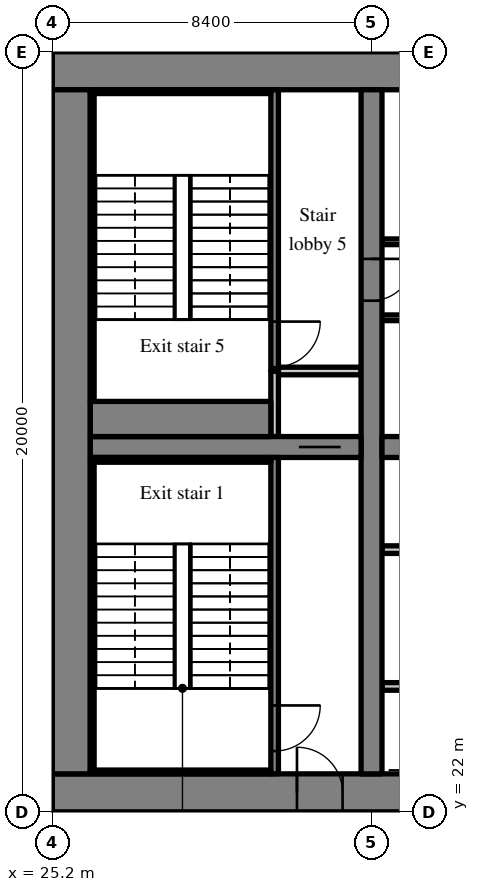
"""IFC4 building model, lengths in metres.
Left out: names, types, materials, properties, quantities, classifications, styles, units other than length and angle.
Written with IfcOpenShell. Run it as: python <this file> out.ifc"""

import sys

from ifc_helpers import new_model, si_unit, direction, frame, frame_2d, origin, place, context, subcontext, project, spatial, rectangle, extrude, source, transform, mapped, element, fill, save


model = new_model("IFC4")
c1 = context("Model", 3, precision=1e-05, world=origin(), true_north=direction((0.0, 1.0)))
c2 = subcontext(c1, "Body", "Model", "MODEL_VIEW")
j1 = project(units=[si_unit("LENGTHUNIT", "METRE"), si_unit("PLANEANGLEUNIT", "RADIAN")], contexts=[c1])
p1 = place(None, origin())
s1 = spatial("IfcSite", under=j1, at=p1, CompositionType="ELEMENT")
p2 = place(p1, origin())
s2 = spatial("IfcBuilding", under=s1, at=p2, CompositionType="ELEMENT")
p3 = place(p2, frame((0.0, 0.0, 58.2)))
s3 = spatial("IfcBuildingStorey", under=s2, at=p3, CompositionType="ELEMENT", Elevation=58.2)
m1 = source(origin(), c2, "Body", "SweptSolid", [
    extrude(rectangle(XDim=50.4, YDim=1.0, at=frame_2d((25.2, 0.0))), origin(), (0.0, 0.0, 1.0), 3.52),
])
p4 = place(p3, frame((25.2, 22.5, 0.0), z_axis=(0.0, 0.0, 1.0), x_axis=(1.0, 0.0, 0.0)))
e1 = element("IfcWall", 1, at=p4, inside=s3, PredefinedType="SHEAR", context=c2, shape_type="MappedRepresentation", body=[
    mapped(m1, transform((0.0, 0.0, 0.0), scale=1.0)),
])
m2 = source(origin(), c2, "Body", "SweptSolid", [
    extrude(rectangle(XDim=1.8, YDim=2.1, at=frame_2d((0.9, 1.05))), frame((0.0, 0.51, 0.0), z_axis=(0.0, -1.0, 0.0), x_axis=(1.0, 0.0, 0.0)), (0.0, 0.0, 1.0), 1.02),
])
p5 = place(p4, frame((15.9, 0.0, 0.0)))
e2 = element("IfcOpeningElement", 2, at=p5, cuts=e1, PredefinedType="OPENING", context=c2, shape_type="MappedRepresentation", body=[
    mapped(m2, transform((0.0, 0.0, 0.0), scale=1.0)),
])
m3 = source(origin(), c2, "Body", "SweptSolid", [
    extrude(rectangle(XDim=1.2, YDim=2.1, at=frame_2d((0.6, 1.05))), frame((0.0, 0.51, 0.0), z_axis=(0.0, -1.0, 0.0), x_axis=(1.0, 0.0, 0.0)), (0.0, 0.0, 1.0), 1.02),
])
p6 = place(p4, frame((26.987, 0.0, 0.0)))
e3 = element("IfcOpeningElement", 3, at=p6, cuts=e1, PredefinedType="OPENING", context=c2, shape_type="MappedRepresentation", body=[
    mapped(m3, transform((0.0, 0.0, 0.0), scale=1.0)),
])
m4 = source(origin(), c2, "Body", "SweptSolid", [
    extrude(rectangle(XDim=0.9, YDim=2.1, at=frame_2d((0.45, 1.05))), frame((0.0, 0.51, 0.0), z_axis=(0.0, -1.0, 0.0), x_axis=(1.0, 0.0, 0.0)), (0.0, 0.0, 1.0), 1.02),
])
p7 = place(p4, frame((34.5, 0.0, 0.0)))
e4 = element("IfcOpeningElement", 4, at=p7, cuts=e1, PredefinedType="OPENING", context=c2, shape_type="MappedRepresentation", body=[
    mapped(m4, transform((0.0, 0.0, 0.0), scale=1.0)),
])
p8 = place(p4, frame((31.5, 0.0, 0.0)))
e5 = element("IfcOpeningElement", 5, at=p8, cuts=e1, PredefinedType="OPENING", context=c2, shape_type="MappedRepresentation", body=[
    mapped(m4, transform((0.0, 0.0, 0.0), scale=1.0)),
])
p9 = place(p4, frame((39.769, 0.0, 0.0)))
e6 = element("IfcOpeningElement", 6, at=p9, cuts=e1, PredefinedType="OPENING", context=c2, shape_type="MappedRepresentation", body=[
    mapped(m4, transform((0.0, 0.0, 0.0), scale=1.0)),
])
p10 = place(p4, frame((36.756, 0.0, 0.0)))
e7 = element("IfcOpeningElement", 7, at=p10, cuts=e1, PredefinedType="OPENING", context=c2, shape_type="MappedRepresentation", body=[
    mapped(m4, transform((0.0, 0.0, 0.0), scale=1.0)),
])
p11 = place(p4, frame((6.438, 0.0, 0.0)))
e8 = element("IfcOpeningElement", 8, at=p11, cuts=e1, PredefinedType="OPENING", context=c2, shape_type="MappedRepresentation", body=[
    mapped(m3, transform((0.0, 0.0, 0.0), scale=1.0)),
])
p12 = place(p4, frame((47.725, 0.0, 0.0)))
e9 = element("IfcOpeningElement", 9, at=p12, cuts=e1, PredefinedType="OPENING", context=c2, shape_type="MappedRepresentation", body=[
    mapped(m3, transform((0.0, 0.0, 0.0), scale=1.0)),
])
p13 = place(p3, frame((25.2, 41.5, 0.0), z_axis=(0.0, 0.0, 1.0), x_axis=(1.0, 0.0, 0.0)))
e10 = element("IfcWall", 10, at=p13, inside=s3, PredefinedType="SHEAR", context=c2, shape_type="MappedRepresentation", body=[
    mapped(m1, transform((0.0, 0.0, 0.0), scale=1.0)),
])
m5 = source(origin(), c2, "Body", "SweptSolid", [
    extrude(rectangle(XDim=18.0, YDim=1.0, at=frame_2d((9.0, 0.0))), origin(), (0.0, 0.0, 1.0), 3.52),
])
p14 = place(p3, frame((25.7, 23.0, 0.0), z_axis=(0.0, 0.0, 1.0), x_axis=(0.0, 1.0, 0.0)))
e11 = element("IfcWall", 11, at=p14, inside=s3, PredefinedType="SHEAR", context=c2, shape_type="MappedRepresentation", body=[
    mapped(m5, transform((0.0, 0.0, 0.0), scale=1.0)),
])
m6 = source(origin(), c2, "Body", "SweptSolid", [
    extrude(rectangle(XDim=18.0, YDim=0.55, at=frame_2d((9.0, 0.0))), origin(), (0.0, 0.0, 1.0), 3.52),
])
p15 = place(p3, frame((33.6, 23.0, 0.0), z_axis=(0.0, 0.0, 1.0), x_axis=(0.0, 1.0, 0.0)))
e12 = element("IfcWall", 12, at=p15, inside=s3, PredefinedType="SHEAR", context=c2, shape_type="MappedRepresentation", body=[
    mapped(m6, transform((0.0, 0.0, 0.0), scale=1.0)),
])
m7 = source(origin(), c2, "Body", "SweptSolid", [
    extrude(rectangle(XDim=1.1, YDim=2.1, at=frame_2d((0.55, 1.05))), frame((0.0, 0.285, 0.0), z_axis=(0.0, -1.0, 0.0), x_axis=(1.0, 0.0, 0.0)), (0.0, 0.0, 1.0), 0.57),
])
p16 = place(p15, frame((12.45, 0.0, 0.0)))
e13 = element("IfcOpeningElement", 13, at=p16, cuts=e12, PredefinedType="OPENING", context=c2, shape_type="MappedRepresentation", body=[
    mapped(m7, transform((0.0, 0.0, 0.0), scale=1.0)),
])
m8 = source(origin(), c2, "Body", "SweptSolid", [
    extrude(rectangle(XDim=7.125, YDim=0.55, at=frame_2d((3.562, 0.0))), origin(), (0.0, 0.0, 1.0), 3.52),
])
p17 = place(p3, frame((26.2, 31.6, 0.0), z_axis=(0.0, 0.0, 1.0), x_axis=(1.0, 0.0, 0.0)))
e14 = element("IfcWall", 14, at=p17, inside=s3, PredefinedType="SHEAR", context=c2, shape_type="MappedRepresentation", body=[
    mapped(m8, transform((0.0, 0.0, 0.0), scale=1.0)),
])
p18 = place(p17, frame((5.488, 0.0, 0.0)))
e15 = element("IfcOpeningElement", 15, at=p18, cuts=e14, PredefinedType="OPENING", context=c2, shape_type="MappedRepresentation", body=[
    mapped(m7, transform((0.0, 0.0, 0.0), scale=1.0)),
])
m9 = source(origin(), c2, "Body", "SweptSolid", [
    extrude(rectangle(XDim=16.25, YDim=0.55, at=frame_2d((8.125, 0.0))), origin(), (0.0, 0.0, 1.0), 3.52),
])
p19 = place(p3, frame((33.875, 31.6, 0.0), z_axis=(0.0, 0.0, 1.0), x_axis=(1.0, 0.0, 0.0)))
e16 = element("IfcWall", 16, at=p19, inside=s3, PredefinedType="SHEAR", context=c2, shape_type="MappedRepresentation", body=[
    mapped(m9, transform((0.0, 0.0, 0.0), scale=1.0)),
])
m10 = source(origin(), c2, "Body", "SweptSolid", [
    extrude(rectangle(XDim=1.0, YDim=2.1, at=frame_2d((0.5, 1.05))), frame((0.0, 0.285, 0.0), z_axis=(0.0, -1.0, 0.0), x_axis=(1.0, 0.0, 0.0)), (0.0, 0.0, 1.0), 0.57),
])
p20 = place(p19, frame((14.687, 0.0, 0.0)))
e17 = element("IfcOpeningElement", 17, at=p20, cuts=e16, PredefinedType="OPENING", context=c2, shape_type="MappedRepresentation", body=[
    mapped(m10, transform((0.0, 0.0, 0.0), scale=1.0)),
])
m11 = source(origin(), c2, "Body", "SweptSolid", [
    extrude(rectangle(XDim=3.559, YDim=0.3, at=frame_2d((1.78, 0.0))), origin(), (0.0, 0.0, 1.0), 3.52),
])
p21 = place(p3, frame((25.55, 39.969, 0.0), z_axis=(0.0, 0.0, 1.0), x_axis=(-0.35779745313, 0.933799219604, 0.0)))
e18 = element("IfcWall", 18, at=p21, inside=s3, PredefinedType="SOLIDWALL", context=c2, shape_type="MappedRepresentation", body=[
    mapped(m11, transform((0.0, 0.0, 0.0), scale=1.0)),
])
m12 = source(origin(), c2, "Body", "SweptSolid", [
    extrude(rectangle(XDim=1.5, YDim=2.0, at=frame_2d((0.75, 1.0))), frame((0.0, 0.16, 0.0), z_axis=(0.0, -1.0, 0.0), x_axis=(1.0, 0.0, 0.0)), (0.0, 0.0, 1.0), 0.32),
])
p22 = place(p21, frame((1.903, 0.0, 0.9)))
e19 = element("IfcOpeningElement", 19, at=p22, cuts=e18, PredefinedType="OPENING", context=c2, shape_type="MappedRepresentation", body=[
    mapped(m12, transform((0.0, 0.0, 0.0), scale=1.0)),
])
m13 = source(origin(), c2, "Body", "SweptSolid", [
    extrude(rectangle(XDim=6.025, YDim=0.2, at=frame_2d((3.012, 0.0))), origin(), (0.0, 0.0, 1.0), 3.52),
])
p23 = place(p3, frame((33.875, 25.3, 0.0), z_axis=(0.0, 0.0, 1.0), x_axis=(1.0, 0.0, 0.0)))
e20 = element("IfcWall", 20, at=p23, inside=s3, PredefinedType="SOLIDWALL", context=c2, shape_type="MappedRepresentation", body=[
    mapped(m13, transform((0.0, 0.0, 0.0), scale=1.0)),
])
m14 = source(origin(), c2, "Body", "SweptSolid", [
    extrude(rectangle(XDim=1.1, YDim=2.1, at=frame_2d((0.55, 1.05))), frame((0.0, 0.11, 0.0), z_axis=(0.0, -1.0, 0.0), x_axis=(1.0, 0.0, 0.0)), (0.0, 0.0, 1.0), 0.22),
])
p24 = place(p23, frame((0.975, 0.0, 0.0)))
e21 = element("IfcOpeningElement", 21, at=p24, cuts=e20, PredefinedType="OPENING", context=c2, shape_type="MappedRepresentation", body=[
    mapped(m14, transform((0.0, 0.0, 0.0), scale=1.0)),
])
p25 = place(p23, frame((3.975, 0.0, 0.0)))
e22 = element("IfcOpeningElement", 22, at=p25, cuts=e20, PredefinedType="OPENING", context=c2, shape_type="MappedRepresentation", body=[
    mapped(m14, transform((0.0, 0.0, 0.0), scale=1.0)),
])
m15 = source(origin(), c2, "Body", "SweptSolid", [
    extrude(rectangle(XDim=12.025, YDim=0.2, at=frame_2d((6.012, 0.0))), origin(), (0.0, 0.0, 1.0), 3.52),
])
p26 = place(p3, frame((33.875, 28.9, 0.0), z_axis=(0.0, 0.0, 1.0), x_axis=(1.0, 0.0, 0.0)))
e23 = element("IfcWall", 23, at=p26, inside=s3, PredefinedType="SOLIDWALL", context=c2, shape_type="MappedRepresentation", body=[
    mapped(m15, transform((0.0, 0.0, 0.0), scale=1.0)),
])
p27 = place(p26, frame((0.975, 0.0, 0.0)))
e24 = element("IfcOpeningElement", 24, at=p27, cuts=e23, PredefinedType="OPENING", context=c2, shape_type="MappedRepresentation", body=[
    mapped(m14, transform((0.0, 0.0, 0.0), scale=1.0)),
])
p28 = place(p26, frame((3.975, 0.0, 0.0)))
e25 = element("IfcOpeningElement", 25, at=p28, cuts=e23, PredefinedType="OPENING", context=c2, shape_type="MappedRepresentation", body=[
    mapped(m14, transform((0.0, 0.0, 0.0), scale=1.0)),
])
p29 = place(p26, frame((6.975, 0.0, 0.0)))
e26 = element("IfcOpeningElement", 26, at=p29, cuts=e23, PredefinedType="OPENING", context=c2, shape_type="MappedRepresentation", body=[
    mapped(m14, transform((0.0, 0.0, 0.0), scale=1.0)),
])
p30 = place(p26, frame((9.975, 0.0, 0.0)))
e27 = element("IfcOpeningElement", 27, at=p30, cuts=e23, PredefinedType="OPENING", context=c2, shape_type="MappedRepresentation", body=[
    mapped(m14, transform((0.0, 0.0, 0.0), scale=1.0)),
])
m16 = source(origin(), c2, "Body", "SweptSolid", [
    extrude(rectangle(XDim=14.125, YDim=0.15, at=frame_2d((7.062, 0.0))), origin(), (0.0, 0.0, 1.0), 3.52),
])
p31 = place(p3, frame((33.875, 35.0, 0.0), z_axis=(0.0, 0.0, 1.0), x_axis=(1.0, 0.0, 0.0)))
e28 = element("IfcWall", 28, at=p31, inside=s3, PredefinedType="PARTITIONING", context=c2, shape_type="MappedRepresentation", body=[
    mapped(m16, transform((0.0, 0.0, 0.0), scale=1.0)),
])
m17 = source(origin(), c2, "Body", "SweptSolid", [
    extrude(rectangle(XDim=0.9, YDim=2.1, at=frame_2d((0.45, 1.05))), frame((0.0, 0.085, 0.0), z_axis=(0.0, -1.0, 0.0), x_axis=(1.0, 0.0, 0.0)), (0.0, 0.0, 1.0), 0.17),
])
p32 = place(p31, frame((2.009, 0.0, 0.0)))
e29 = element("IfcOpeningElement", 29, at=p32, cuts=e28, PredefinedType="OPENING", context=c2, shape_type="MappedRepresentation", body=[
    mapped(m17, transform((0.0, 0.0, 0.0), scale=1.0)),
])
p33 = place(p31, frame((9.034, 0.0, 0.0)))
e30 = element("IfcOpeningElement", 30, at=p33, cuts=e28, PredefinedType="OPENING", context=c2, shape_type="MappedRepresentation", body=[
    mapped(m17, transform((0.0, 0.0, 0.0), scale=1.0)),
])
m18 = source(origin(), c2, "Body", "SweptSolid", [
    extrude(rectangle(XDim=16.25, YDim=0.15, at=frame_2d((8.125, 0.0))), origin(), (0.0, 0.0, 1.0), 3.52),
])
p34 = place(p3, frame((33.875, 37.0, 0.0), z_axis=(0.0, 0.0, 1.0), x_axis=(1.0, 0.0, 0.0)))
e31 = element("IfcWall", 31, at=p34, inside=s3, PredefinedType="PARTITIONING", context=c2, shape_type="MappedRepresentation", body=[
    mapped(m18, transform((0.0, 0.0, 0.0), scale=1.0)),
])
p35 = place(p34, frame((3.206, 0.0, 0.0)))
e32 = element("IfcOpeningElement", 32, at=p35, cuts=e31, PredefinedType="OPENING", context=c2, shape_type="MappedRepresentation", body=[
    mapped(m17, transform((0.0, 0.0, 0.0), scale=1.0)),
])
p36 = place(p34, frame((8.081, 0.0, 0.0)))
e33 = element("IfcOpeningElement", 33, at=p36, cuts=e31, PredefinedType="OPENING", context=c2, shape_type="MappedRepresentation", body=[
    mapped(m17, transform((0.0, 0.0, 0.0), scale=1.0)),
])
p37 = place(p34, frame((11.331, 0.0, 0.0)))
e34 = element("IfcOpeningElement", 34, at=p37, cuts=e31, PredefinedType="OPENING", context=c2, shape_type="MappedRepresentation", body=[
    mapped(m17, transform((0.0, 0.0, 0.0), scale=1.0)),
])
p38 = place(p34, frame((14.581, 0.0, 0.0)))
e35 = element("IfcOpeningElement", 35, at=p38, cuts=e31, PredefinedType="OPENING", context=c2, shape_type="MappedRepresentation", body=[
    mapped(m17, transform((0.0, 0.0, 0.0), scale=1.0)),
])
m19 = source(origin(), c2, "Body", "SweptSolid", [
    extrude(rectangle(XDim=8.325, YDim=0.2, at=frame_2d((4.163, 0.0))), origin(), (0.0, 0.0, 1.0), 3.52),
])
p39 = place(p3, frame((31.05, 23.0, 0.0), z_axis=(0.0, 0.0, 1.0), x_axis=(0.0, 1.0, 0.0)))
e36 = element("IfcWall", 36, at=p39, inside=s3, PredefinedType="SOLIDWALL", context=c2, shape_type="MappedRepresentation", body=[
    mapped(m19, transform((0.0, 0.0, 0.0), scale=1.0)),
])
m20 = source(origin(), c2, "Body", "SweptSolid", [
    extrude(rectangle(XDim=1.2, YDim=2.1, at=frame_2d((0.6, 1.05))), frame((0.0, 0.11, 0.0), z_axis=(0.0, -1.0, 0.0), x_axis=(1.0, 0.0, 0.0)), (0.0, 0.0, 1.0), 0.22),
])
p40 = place(p39, frame((0.6, 0.0, 0.0)))
e37 = element("IfcOpeningElement", 37, at=p40, cuts=e36, PredefinedType="OPENING", context=c2, shape_type="MappedRepresentation", body=[
    mapped(m20, transform((0.0, 0.0, 0.0), scale=1.0)),
])
m21 = source(origin(), c2, "Body", "SweptSolid", [
    extrude(rectangle(XDim=1.725, YDim=0.2, at=frame_2d((0.863, 0.0))), origin(), (0.0, 0.0, 1.0), 3.52),
])
p41 = place(p3, frame((31.05, 31.875, 0.0), z_axis=(0.0, 0.0, 1.0), x_axis=(0.0, 1.0, 0.0)))
e38 = element("IfcWall", 38, at=p41, inside=s3, PredefinedType="SOLIDWALL", context=c2, shape_type="MappedRepresentation", body=[
    mapped(m21, transform((0.0, 0.0, 0.0), scale=1.0)),
])
m22 = source(origin(), c2, "Body", "SweptSolid", [
    extrude(rectangle(XDim=2.175, YDim=0.2, at=frame_2d((1.087, 0.0))), origin(), (0.0, 0.0, 1.0), 3.52),
])
p42 = place(p3, frame((31.15, 33.6, 0.0), z_axis=(0.0, 0.0, 1.0), x_axis=(1.0, 0.0, 0.0)))
e39 = element("IfcWall", 39, at=p42, inside=s3, PredefinedType="SOLIDWALL", context=c2, shape_type="MappedRepresentation", body=[
    mapped(m22, transform((0.0, 0.0, 0.0), scale=1.0)),
])
m23 = source(origin(), c2, "Body", "SweptSolid", [
    extrude(rectangle(XDim=7.4, YDim=0.2, at=frame_2d((3.7, 0.0))), origin(), (0.0, 0.0, 1.0), 3.52),
])
p43 = place(p3, frame((31.05, 33.6, 0.0), z_axis=(0.0, 0.0, 1.0), x_axis=(0.0, 1.0, 0.0)))
e40 = element("IfcWall", 40, at=p43, inside=s3, PredefinedType="SOLIDWALL", context=c2, shape_type="MappedRepresentation", body=[
    mapped(m23, transform((0.0, 0.0, 0.0), scale=1.0)),
])
p44 = place(p43, frame((0.1, 0.0, 0.0)))
e41 = element("IfcOpeningElement", 41, at=p44, cuts=e40, PredefinedType="OPENING", context=c2, shape_type="MappedRepresentation", body=[
    mapped(m20, transform((0.0, 0.0, 0.0), scale=1.0)),
])
m24 = source(origin(), c2, "Body", "SweptSolid", [
    extrude(rectangle(XDim=8.2, YDim=0.2, at=frame_2d((4.1, 0.0))), origin(), (0.0, 0.0, 1.0), 3.52),
])
p45 = place(p3, frame((17.0, 22.1, 0.0), z_axis=(0.0, 0.0, 1.0), x_axis=(1.0, 0.0, 0.0)))
e42 = element("IfcWall", 42, at=p45, inside=s3, PredefinedType="SOLIDWALL", context=c2, shape_type="MappedRepresentation", body=[
    mapped(m24, transform((0.0, 0.0, 0.0), scale=1.0)),
])
p46 = place(p45, frame((6.0, 0.0, 0.0)))
e43 = element("IfcOpeningElement", 43, at=p46, cuts=e42, PredefinedType="OPENING", context=c2, shape_type="MappedRepresentation", body=[
    mapped(m20, transform((0.0, 0.0, 0.0), scale=1.0)),
])
p47 = place(p3, frame((17.0, 30.4, 0.0), z_axis=(0.0, 0.0, 1.0), x_axis=(1.0, 0.0, 0.0)))
e44 = element("IfcWall", 44, at=p47, inside=s3, PredefinedType="SOLIDWALL", context=c2, shape_type="MappedRepresentation", body=[
    mapped(m24, transform((0.0, 0.0, 0.0), scale=1.0)),
])
m25 = source(origin(), c2, "Body", "SweptSolid", [
    extrude(rectangle(XDim=1.0, YDim=2.1, at=frame_2d((0.5, 1.05))), frame((0.0, 0.11, 0.0), z_axis=(0.0, -1.0, 0.0), x_axis=(1.0, 0.0, 0.0)), (0.0, 0.0, 1.0), 0.22),
])
p48 = place(p47, frame((6.1, 0.0, 0.0)))
e45 = element("IfcOpeningElement", 45, at=p48, cuts=e44, PredefinedType="OPENING", context=c2, shape_type="MappedRepresentation", body=[
    mapped(m25, transform((0.0, 0.0, 0.0), scale=1.0)),
])
m26 = source(origin(), c2, "Body", "SweptSolid", [
    extrude(rectangle(XDim=4.75, YDim=0.1, at=frame_2d((2.375, 0.0))), origin(), (0.0, 0.0, 1.0), 3.52),
])
p49 = place(p3, frame((26.2, 23.05, 0.0), z_axis=(0.0, 0.0, 1.0), x_axis=(1.0, 0.0, 0.0)))
e46 = element("IfcWall", 46, at=p49, inside=s3, PredefinedType="SOLIDWALL", context=c2, shape_type="MappedRepresentation", body=[
    mapped(m26, transform((0.0, 0.0, 0.0), scale=1.0)),
])
m27 = source(origin(), c2, "Body", "SweptSolid", [
    extrude(rectangle(XDim=4.75, YDim=0.125, at=frame_2d((2.375, 0.0))), origin(), (0.0, 0.0, 1.0), 3.52),
])
p50 = place(p3, frame((26.2, 31.262, 0.0), z_axis=(0.0, 0.0, 1.0), x_axis=(1.0, 0.0, 0.0)))
e47 = element("IfcWall", 47, at=p50, inside=s3, PredefinedType="SOLIDWALL", context=c2, shape_type="MappedRepresentation", body=[
    mapped(m27, transform((0.0, 0.0, 0.0), scale=1.0)),
])
m28 = source(origin(), c2, "Body", "SweptSolid", [
    extrude(rectangle(XDim=8.1, YDim=0.1, at=frame_2d((4.05, 0.0))), origin(), (0.0, 0.0, 1.0), 3.52),
])
p51 = place(p3, frame((26.25, 23.1, 0.0), z_axis=(0.0, 0.0, 1.0), x_axis=(0.0, 1.0, 0.0)))
e48 = element("IfcWall", 48, at=p51, inside=s3, PredefinedType="SOLIDWALL", context=c2, shape_type="MappedRepresentation", body=[
    mapped(m28, transform((0.0, 0.0, 0.0), scale=1.0)),
])
p52 = place(p3, frame((26.2, 40.95, 0.0), z_axis=(0.0, 0.0, 1.0), x_axis=(1.0, 0.0, 0.0)))
e49 = element("IfcWall", 49, at=p52, inside=s3, PredefinedType="SOLIDWALL", context=c2, shape_type="MappedRepresentation", body=[
    mapped(m26, transform((0.0, 0.0, 0.0), scale=1.0)),
])
m29 = source(origin(), c2, "Body", "SweptSolid", [
    extrude(rectangle(XDim=4.75, YDim=0.925, at=frame_2d((2.375, 0.0))), origin(), (0.0, 0.0, 1.0), 3.52),
])
p53 = place(p3, frame((26.2, 32.337, 0.0), z_axis=(0.0, 0.0, 1.0), x_axis=(1.0, 0.0, 0.0)))
e50 = element("IfcWall", 50, at=p53, inside=s3, PredefinedType="SOLIDWALL", context=c2, shape_type="MappedRepresentation", body=[
    mapped(m29, transform((0.0, 0.0, 0.0), scale=1.0)),
])
p54 = place(p3, frame((26.25, 32.8, 0.0), z_axis=(0.0, 0.0, 1.0), x_axis=(0.0, 1.0, 0.0)))
e51 = element("IfcWall", 51, at=p54, inside=s3, PredefinedType="SOLIDWALL", context=c2, shape_type="MappedRepresentation", body=[
    mapped(m28, transform((0.0, 0.0, 0.0), scale=1.0)),
])
m30 = source(origin(), c2, "Body", "SweptSolid", [
    extrude(rectangle(XDim=1.2, YDim=2.1, at=frame_2d((0.6, 1.05))), frame((0.0, 0.025, 0.0), z_axis=(0.0, -1.0, 0.0), x_axis=(1.0, 0.0, 0.0)), (0.0, 0.0, 1.0), 0.05),
])
p55 = place(p40, origin())
e52 = element("IfcDoor", 52, at=p55, inside=s3, OperationType="SINGLE_SWING_RIGHT", PredefinedType="DOOR", context=c2, shape_type="MappedRepresentation", body=[
    mapped(m30, transform((0.0, 0.0, 0.0), scale=1.0)),
])
fill(e37, e52)
m31 = source(origin(), c2, "Body", "SweptSolid", [
    extrude(rectangle(XDim=1.2, YDim=2.1, at=frame_2d((0.6, 1.05))), frame((0.0, 0.375, 0.0), z_axis=(0.0, -1.0, 0.0), x_axis=(1.0, 0.0, 0.0)), (0.0, 0.0, 1.0), 0.05),
])
p56 = place(p11, origin())
e53 = element("IfcDoor", 53, at=p56, inside=s3, OperationType="SINGLE_SWING_LEFT", PredefinedType="DOOR", context=c2, shape_type="MappedRepresentation", body=[
    mapped(m31, transform((0.0, 0.0, 0.0), scale=1.0)),
])
fill(e8, e53)
m32 = source(origin(), c2, "Body", "SweptSolid", [
    extrude(rectangle(XDim=1.1, YDim=2.1, at=frame_2d((0.55, 1.05))), frame((0.0, 0.025, 0.0), z_axis=(0.0, -1.0, 0.0), x_axis=(1.0, 0.0, 0.0)), (0.0, 0.0, 1.0), 0.05),
])
p57 = place(p18, origin())
e54 = element("IfcDoor", 54, at=p57, inside=s3, OperationType="SLIDING_TO_RIGHT", PredefinedType="DOOR", context=c2, shape_type="MappedRepresentation", body=[
    mapped(m32, transform((0.0, 0.0, 0.0), scale=1.0)),
])
fill(e15, e54)
p58 = place(p44, origin())
e55 = element("IfcDoor", 55, at=p58, inside=s3, OperationType="SINGLE_SWING_RIGHT", PredefinedType="DOOR", context=c2, shape_type="MappedRepresentation", body=[
    mapped(m30, transform((0.0, 0.0, 0.0), scale=1.0)),
])
fill(e41, e55)
p59 = place(p16, origin())
e56 = element("IfcDoor", 56, at=p59, inside=s3, OperationType="SINGLE_SWING_RIGHT", PredefinedType="DOOR", context=c2, shape_type="MappedRepresentation", body=[
    mapped(m32, transform((0.0, 0.0, 0.0), scale=1.0)),
])
fill(e13, e56)
save(model, sys.argv[1])
